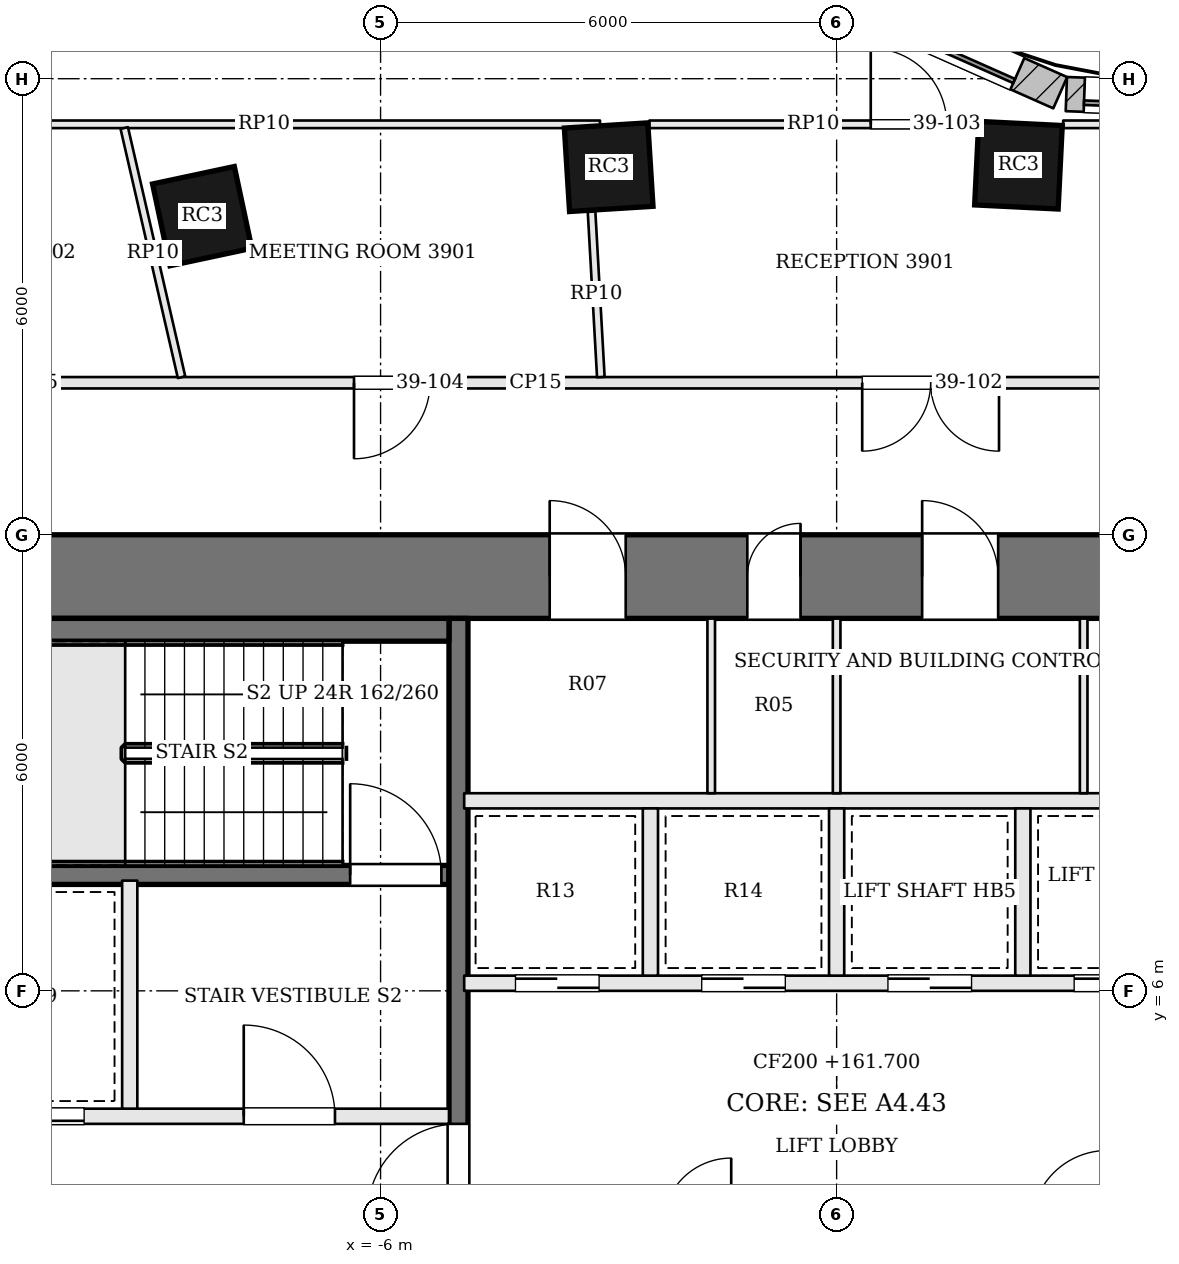
"""IFC4 building model, lengths in metres.
Left out: names, types, materials, properties, quantities, classifications, styles, units other than length and angle.
Written with IfcOpenShell. Run it as: python <this file> out.ifc"""

import sys

from ifc_helpers import new_model, si_unit, direction, frame, frame_2d, origin, origin_2d, place, context, subcontext, project, spatial, rectangle, extrude, element, fill, save


model = new_model("IFC4")
c1 = context("Model", 3, precision=1e-05, world=origin(), true_north=direction((0.0, 1.0)))
c2 = subcontext(c1, "Body", "Model", "MODEL_VIEW")
j1 = project(units=[si_unit("LENGTHUNIT", "METRE"), si_unit("PLANEANGLEUNIT", "RADIAN")], contexts=[c1])
p1 = place(None, origin())
s1 = spatial("IfcSite", under=j1, at=p1, CompositionType="ELEMENT")
p2 = place(p1, origin())
s2 = spatial("IfcBuilding", under=s1, at=p2, CompositionType="ELEMENT")
p3 = place(p2, frame((0.0, 0.0, 161.7)))
s3 = spatial("IfcBuildingStorey", under=s2, at=p3, CompositionType="ELEMENT", Elevation=161.7)
p4 = place(p3, frame((-13.0, 11.45, 0.0), z_axis=(0.0, 0.0, 1.0), x_axis=(1.0, 0.0, 0.0)))
e1 = element("IfcWall", 1, at=p4, inside=s3, PredefinedType="SHEAR", context=c2, shape_type="SweptSolid", body=[
    extrude(rectangle(XDim=26.0, YDim=1.1, at=frame_2d((13.0, 0.0))), origin(), (0.0, 0.0, 1.0), 3.9),
])
p5 = place(p4, frame((9.225, 0.0, 0.0)))
e2 = element("IfcOpeningElement", 2, at=p5, cuts=e1, PredefinedType="OPENING", context=c2, shape_type="SweptSolid", body=[
    extrude(rectangle(XDim=1.0, YDim=2.1, at=frame_2d((0.5, 1.05))), frame((0.0, 0.56, 0.0), z_axis=(0.0, -1.0, 0.0), x_axis=(1.0, 0.0, 0.0)), (0.0, 0.0, 1.0), 1.12),
])
p6 = place(p4, frame((11.825, 0.0, 0.0)))
e3 = element("IfcOpeningElement", 3, at=p6, cuts=e1, PredefinedType="OPENING", context=c2, shape_type="SweptSolid", body=[
    extrude(rectangle(XDim=0.7, YDim=2.1, at=frame_2d((0.35, 1.05))), frame((0.0, 0.56, 0.0), z_axis=(0.0, -1.0, 0.0), x_axis=(1.0, 0.0, 0.0)), (0.0, 0.0, 1.0), 1.12),
])
p7 = place(p4, frame((14.125, 0.0, 0.0)))
e4 = element("IfcOpeningElement", 4, at=p7, cuts=e1, PredefinedType="OPENING", context=c2, shape_type="SweptSolid", body=[
    extrude(rectangle(XDim=1.0, YDim=2.1, at=frame_2d((0.5, 1.05))), frame((0.0, 0.56, 0.0), z_axis=(0.0, -1.0, 0.0), x_axis=(1.0, 0.0, 0.0)), (0.0, 0.0, 1.0), 1.12),
])
p8 = place(p4, frame((16.625, 0.0, 0.0)))
e5 = element("IfcOpeningElement", 5, at=p8, cuts=e1, PredefinedType="OPENING", context=c2, shape_type="SweptSolid", body=[
    extrude(rectangle(XDim=0.9, YDim=2.1, at=frame_2d((0.45, 1.05))), frame((0.0, 0.56, 0.0), z_axis=(0.0, -1.0, 0.0), x_axis=(1.0, 0.0, 0.0)), (0.0, 0.0, 1.0), 1.12),
])
for number, where, z_axis, x_axis in (
    (6, (2.392, 16.862, 0.0), (0.0, 0.0, 1.0), (-0.999, 0.049, 0.0)),
    (7, (-2.999, 16.836, 0.0), (0.0, 0.0, 1.0), (-0.998, -0.062, 0.0)),
    (8, (-8.347, 16.192, 0.0), (0.0, 0.0, 1.0), (-0.978, -0.209, 0.0)),
):
    element("IfcColumn", number, at=place(p3, frame(where, z_axis=z_axis, x_axis=x_axis)), inside=s3, PredefinedType="COLUMN", context=c2, shape_type="SweptSolid", body=[
        extrude(rectangle(XDim=1.1, YDim=1.1, at=origin_2d()), origin(), (0.0, 0.0, 1.0), 3.9),
    ])
p9 = place(p3, frame((5.594, 17.704, 0.0), z_axis=(0.0, 0.0, 1.0), x_axis=(-0.999339560591, 0.036337895349, 0.0)))
e9 = element("IfcWall", 9, at=p9, inside=s3, PredefinedType="SOLIDWALL", context=c2, shape_type="SweptSolid", body=[
    extrude(rectangle(XDim=2.573, YDim=0.45, at=frame_2d((1.287, 0.0))), origin(), (0.0, 0.0, 1.0), 3.7),
])
p10 = place(p9, frame((0.237, 0.0, 0.9)))
e10 = element("IfcOpeningElement", 10, at=p10, cuts=e9, PredefinedType="OPENING", context=c2, shape_type="SweptSolid", body=[
    extrude(rectangle(XDim=2.1, YDim=2.3, at=frame_2d((1.05, 1.15))), frame((0.0, 0.235, 0.0), z_axis=(0.0, -1.0, 0.0), x_axis=(1.0, 0.0, 0.0)), (0.0, 0.0, 1.0), 0.47),
])
p11 = place(p3, frame((2.942, 17.816, 0.0), z_axis=(0.0, 0.0, 1.0), x_axis=(-0.91414046241, 0.405397601109, 0.0)))
e11 = element("IfcWall", 11, at=p11, inside=s3, PredefinedType="SOLIDWALL", context=c2, shape_type="SweptSolid", body=[
    extrude(rectangle(XDim=3.333, YDim=0.45, at=frame_2d((1.667, 0.0))), origin(), (0.0, 0.0, 1.0), 3.7),
])
p12 = place(p11, frame((0.617, 0.0, 0.9)))
e12 = element("IfcOpeningElement", 12, at=p12, cuts=e11, PredefinedType="OPENING", context=c2, shape_type="SweptSolid", body=[
    extrude(rectangle(XDim=2.1, YDim=2.3, at=frame_2d((1.05, 1.15))), frame((0.0, 0.235, 0.0), z_axis=(0.0, -1.0, 0.0), x_axis=(1.0, 0.0, 0.0)), (0.0, 0.0, 1.0), 0.47),
])
p13 = place(p3, frame((-9.984, 19.745, 0.0), z_axis=(0.0, 0.0, 1.0), x_axis=(-0.701875966769, -0.712299183821, 0.0)))
e13 = element("IfcWall", 13, at=p13, inside=s3, PredefinedType="SOLIDWALL", context=c2, shape_type="SweptSolid", body=[
    extrude(rectangle(XDim=3.537, YDim=0.45, at=frame_2d((1.769, 0.0))), origin(), (0.0, 0.0, 1.0), 3.7),
])
p14 = place(p13, frame((0.718, 0.0, 0.9)))
e14 = element("IfcOpeningElement", 14, at=p14, cuts=e13, PredefinedType="OPENING", context=c2, shape_type="SweptSolid", body=[
    extrude(rectangle(XDim=2.1, YDim=2.3, at=frame_2d((1.05, 1.15))), frame((0.0, 0.235, 0.0), z_axis=(0.0, -1.0, 0.0), x_axis=(1.0, 0.0, 0.0)), (0.0, 0.0, 1.0), 0.47),
])
p15 = place(p3, frame((-11.9, 4.35, 0.0), z_axis=(0.0, 0.0, 1.0), x_axis=(1.0, 0.0, 0.0)))
e15 = element("IfcWall", 15, at=p15, inside=s3, PredefinedType="SOLIDWALL", context=c2, shape_type="SweptSolid", body=[
    extrude(rectangle(XDim=6.8, YDim=0.2, at=frame_2d((3.4, 0.0))), origin(), (0.0, 0.0, 1.0), 3.7),
])
p16 = place(p15, frame((4.1, 0.0, 0.0)))
e16 = element("IfcOpeningElement", 16, at=p16, cuts=e15, PredefinedType="OPENING", context=c2, shape_type="SweptSolid", body=[
    extrude(rectangle(XDim=1.2, YDim=2.1, at=frame_2d((0.6, 1.05))), frame((0.0, 0.11, 0.0), z_axis=(0.0, -1.0, 0.0), x_axis=(1.0, 0.0, 0.0)), (0.0, 0.0, 1.0), 0.22),
])
p17 = place(p15, frame((0.8, 0.0, 0.0)))
e17 = element("IfcOpeningElement", 17, at=p17, cuts=e15, PredefinedType="OPENING", context=c2, shape_type="SweptSolid", body=[
    extrude(rectangle(XDim=1.2, YDim=2.1, at=frame_2d((0.6, 1.05))), frame((0.0, 0.11, 0.0), z_axis=(0.0, -1.0, 0.0), x_axis=(1.0, 0.0, 0.0)), (0.0, 0.0, 1.0), 0.22),
])
p18 = place(p3, frame((-11.9, 7.525, 0.0), z_axis=(0.0, 0.0, 1.0), x_axis=(1.0, 0.0, 0.0)))
e18 = element("IfcWall", 18, at=p18, inside=s3, PredefinedType="SOLIDWALL", context=c2, shape_type="SweptSolid", body=[
    extrude(rectangle(XDim=6.8, YDim=0.25, at=frame_2d((3.4, 0.0))), origin(), (0.0, 0.0, 1.0), 3.7),
])
p19 = place(p18, frame((5.5, 0.0, 0.0)))
e19 = element("IfcOpeningElement", 19, at=p19, cuts=e18, PredefinedType="OPENING", context=c2, shape_type="SweptSolid", body=[
    extrude(rectangle(XDim=1.2, YDim=2.1, at=frame_2d((0.6, 1.05))), frame((0.0, 0.135, 0.0), z_axis=(0.0, -1.0, 0.0), x_axis=(1.0, 0.0, 0.0)), (0.0, 0.0, 1.0), 0.27),
])
p20 = place(p3, frame((-9.3, 4.45, 0.0), z_axis=(0.0, 0.0, 1.0), x_axis=(0.0, 1.0, 0.0)))
e20 = element("IfcWall", 20, at=p20, inside=s3, PredefinedType="SOLIDWALL", context=c2, shape_type="SweptSolid", body=[
    extrude(rectangle(XDim=3.0, YDim=0.2, at=frame_2d((1.5, 0.0))), origin(), (0.0, 0.0, 1.0), 3.7),
])
p21 = place(p3, frame((-4.975, -1.9, 0.0), z_axis=(0.0, 0.0, 1.0), x_axis=(0.0, 1.0, 0.0)))
e21 = element("IfcWall", 21, at=p21, inside=s3, PredefinedType="SOLIDWALL", context=c2, shape_type="SweptSolid", body=[
    extrude(rectangle(XDim=12.8, YDim=0.25, at=frame_2d((6.4, 0.0))), origin(), (0.0, 0.0, 1.0), 3.7),
])
p22 = place(p21, frame((4.95, 0.0, 0.0)))
e22 = element("IfcOpeningElement", 22, at=p22, cuts=e21, PredefinedType="OPENING", context=c2, shape_type="SweptSolid", body=[
    extrude(rectangle(XDim=1.2, YDim=2.1, at=frame_2d((0.6, 1.05))), frame((0.0, 0.135, 0.0), z_axis=(0.0, -1.0, 0.0), x_axis=(1.0, 0.0, 0.0)), (0.0, 0.0, 1.0), 0.27),
])
p23 = place(p3, frame((-11.9, 10.75, 0.0), z_axis=(0.0, 0.0, 1.0), x_axis=(1.0, 0.0, 0.0)))
e23 = element("IfcWall", 23, at=p23, inside=s3, PredefinedType="SOLIDWALL", context=c2, shape_type="SweptSolid", body=[
    extrude(rectangle(XDim=6.8, YDim=0.3, at=frame_2d((3.4, 0.0))), origin(), (0.0, 0.0, 1.0), 3.7),
])
p24 = place(p3, frame((-4.9, 6.1, 0.0), z_axis=(0.0, 0.0, 1.0), x_axis=(1.0, 0.0, 0.0)))
e24 = element("IfcWall", 24, at=p24, inside=s3, PredefinedType="SOLIDWALL", context=c2, shape_type="SweptSolid", body=[
    extrude(rectangle(XDim=9.8, YDim=0.2, at=frame_2d((4.9, 0.0))), origin(), (0.0, 0.0, 1.0), 3.7),
])
p25 = place(p24, frame((0.675, 0.0, 0.0)))
e25 = element("IfcOpeningElement", 25, at=p25, cuts=e24, PredefinedType="OPENING", context=c2, shape_type="SweptSolid", body=[
    extrude(rectangle(XDim=1.1, YDim=2.1, at=frame_2d((0.55, 1.05))), frame((0.0, 0.11, 0.0), z_axis=(0.0, -1.0, 0.0), x_axis=(1.0, 0.0, 0.0)), (0.0, 0.0, 1.0), 0.22),
])
p26 = place(p24, frame((3.125, 0.0, 0.0)))
e26 = element("IfcOpeningElement", 26, at=p26, cuts=e24, PredefinedType="OPENING", context=c2, shape_type="SweptSolid", body=[
    extrude(rectangle(XDim=1.1, YDim=2.1, at=frame_2d((0.55, 1.05))), frame((0.0, 0.11, 0.0), z_axis=(0.0, -1.0, 0.0), x_axis=(1.0, 0.0, 0.0)), (0.0, 0.0, 1.0), 0.22),
])
p27 = place(p24, frame((5.575, 0.0, 0.0)))
e27 = element("IfcOpeningElement", 27, at=p27, cuts=e24, PredefinedType="OPENING", context=c2, shape_type="SweptSolid", body=[
    extrude(rectangle(XDim=1.1, YDim=2.1, at=frame_2d((0.55, 1.05))), frame((0.0, 0.11, 0.0), z_axis=(0.0, -1.0, 0.0), x_axis=(1.0, 0.0, 0.0)), (0.0, 0.0, 1.0), 0.22),
])
p28 = place(p24, frame((8.025, 0.0, 0.0)))
e28 = element("IfcOpeningElement", 28, at=p28, cuts=e24, PredefinedType="OPENING", context=c2, shape_type="SweptSolid", body=[
    extrude(rectangle(XDim=1.1, YDim=2.1, at=frame_2d((0.55, 1.05))), frame((0.0, 0.11, 0.0), z_axis=(0.0, -1.0, 0.0), x_axis=(1.0, 0.0, 0.0)), (0.0, 0.0, 1.0), 0.22),
])
p29 = place(p3, frame((-4.9, 8.5, 0.0), z_axis=(0.0, 0.0, 1.0), x_axis=(1.0, 0.0, 0.0)))
e29 = element("IfcWall", 29, at=p29, inside=s3, PredefinedType="SOLIDWALL", context=c2, shape_type="SweptSolid", body=[
    extrude(rectangle(XDim=9.8, YDim=0.2, at=frame_2d((4.9, 0.0))), origin(), (0.0, 0.0, 1.0), 3.7),
])
for number, where, z_axis, x_axis in (
    (30, (-2.45, 6.2, 0.0), (0.0, 0.0, 1.0), (0.0, 1.0, 0.0)),
    (31, (0.0, 6.2, 0.0), (0.0, 0.0, 1.0), (0.0, 1.0, 0.0)),
    (32, (2.45, 6.2, 0.0), (0.0, 0.0, 1.0), (0.0, 1.0, 0.0)),
):
    element("IfcWall", number, at=place(p3, frame(where, z_axis=z_axis, x_axis=x_axis)), inside=s3, PredefinedType="SOLIDWALL", context=c2, shape_type="SweptSolid", body=[
        extrude(rectangle(XDim=2.2, YDim=0.2, at=frame_2d((1.1, 0.0))), origin(), (0.0, 0.0, 1.0), 3.7),
    ])
for number, where, z_axis, x_axis in (
    (33, (-1.65, 8.6, 0.0), (0.0, 0.0, 1.0), (0.0, 1.0, 0.0)),
    (34, (0.0, 8.6, 0.0), (0.0, 0.0, 1.0), (0.0, 1.0, 0.0)),
    (35, (3.25, 8.6, 0.0), (0.0, 0.0, 1.0), (0.0, 1.0, 0.0)),
):
    element("IfcWall", number, at=place(p3, frame(where, z_axis=z_axis, x_axis=x_axis)), inside=s3, PredefinedType="PARTITIONING", context=c2, shape_type="SweptSolid", body=[
        extrude(rectangle(XDim=2.3, YDim=0.1, at=frame_2d((1.15, 0.0))), origin(), (0.0, 0.0, 1.0), 3.7),
    ])
p30 = place(p3, frame((5.497, 14.0, 0.0), z_axis=(0.0, 0.0, 1.0), x_axis=(-1.0, 0.0, 0.0)))
e36 = element("IfcWall", 36, at=p30, inside=s3, PredefinedType="PARTITIONING", context=c2, shape_type="SweptSolid", body=[
    extrude(rectangle(XDim=18.917, YDim=0.15, at=frame_2d((9.458, 0.0))), origin(), (0.0, 0.0, 1.0), 3.198),
])
p31 = place(p30, frame((3.36, 0.0, 0.0)))
e37 = element("IfcOpeningElement", 37, at=p31, cuts=e36, PredefinedType="OPENING", context=c2, shape_type="SweptSolid", body=[
    extrude(rectangle(XDim=1.8, YDim=2.1, at=frame_2d((0.9, 1.05))), frame((0.0, 0.085, 0.0), z_axis=(0.0, -1.0, 0.0), x_axis=(1.0, 0.0, 0.0)), (0.0, 0.0, 1.0), 0.17),
])
p32 = place(p30, frame((10.846, 0.0, 0.0)))
e38 = element("IfcOpeningElement", 38, at=p32, cuts=e36, PredefinedType="OPENING", context=c2, shape_type="SweptSolid", body=[
    extrude(rectangle(XDim=1.0, YDim=2.4, at=frame_2d((0.5, 1.2))), frame((0.0, 0.085, 0.0), z_axis=(0.0, -1.0, 0.0), x_axis=(1.0, 0.0, 0.0)), (0.0, 0.0, 1.0), 0.17),
])
p33 = place(p30, frame((16.194, 0.0, 0.0)))
e39 = element("IfcOpeningElement", 39, at=p33, cuts=e36, PredefinedType="OPENING", context=c2, shape_type="SweptSolid", body=[
    extrude(rectangle(XDim=1.0, YDim=2.4, at=frame_2d((0.5, 1.2))), frame((0.0, 0.085, 0.0), z_axis=(0.0, -1.0, 0.0), x_axis=(1.0, 0.0, 0.0)), (0.0, 0.0, 1.0), 0.17),
])
p34 = place(p3, frame((-11.951, 17.4, 0.0), z_axis=(0.0, 0.0, 1.0), x_axis=(1.0, 0.0, 0.0)))
e40 = element("IfcWall", 40, at=p34, inside=s3, PredefinedType="PARTITIONING", context=c2, shape_type="SweptSolid", body=[
    extrude(rectangle(XDim=8.838, YDim=0.1, at=frame_2d((4.419, 0.0))), origin(), (0.0, 0.0, 1.0), 3.198),
])
p35 = place(p3, frame((-2.463, 17.4, 0.0), z_axis=(0.0, 0.0, 1.0), x_axis=(1.0, 0.0, 0.0)))
e41 = element("IfcWall", 41, at=p35, inside=s3, PredefinedType="PARTITIONING", context=c2, shape_type="SweptSolid", body=[
    extrude(rectangle(XDim=4.311, YDim=0.1, at=frame_2d((2.156, 0.0))), origin(), (0.0, 0.0, 1.0), 3.198),
])
p36 = place(p35, frame((2.912, 0.0, 0.0)))
e42 = element("IfcOpeningElement", 42, at=p36, cuts=e41, PredefinedType="OPENING", context=c2, shape_type="SweptSolid", body=[
    extrude(rectangle(XDim=1.0, YDim=2.1, at=frame_2d((0.5, 1.05))), frame((0.0, 0.06, 0.0), z_axis=(0.0, -1.0, 0.0), x_axis=(1.0, 0.0, 0.0)), (0.0, 0.0, 1.0), 0.12),
])
p37 = place(p3, frame((2.981, 17.4, 0.0), z_axis=(0.0, 0.0, 1.0), x_axis=(1.0, 0.0, 0.0)))
e43 = element("IfcWall", 43, at=p37, inside=s3, PredefinedType="PARTITIONING", context=c2, shape_type="SweptSolid", body=[
    extrude(rectangle(XDim=2.99, YDim=0.1, at=frame_2d((1.495, 0.0))), origin(), (0.0, 0.0, 1.0), 3.198),
])
p38 = place(p3, frame((-3.102, 14.075, 0.0), z_axis=(0.0, 0.0, 1.0), x_axis=(-0.055904356841, 0.998436128596, 0.0)))
e44 = element("IfcWall", 44, at=p38, inside=s3, PredefinedType="PARTITIONING", context=c2, shape_type="SweptSolid", body=[
    extrude(rectangle(XDim=2.179, YDim=0.1, at=frame_2d((1.09, 0.0))), origin(), (0.0, 0.0, 1.0), 3.198),
])
p39 = place(p3, frame((-8.618, 14.073, 0.0), z_axis=(0.0, 0.0, 1.0), x_axis=(-0.224048430302, 0.974578011695, 0.0)))
e45 = element("IfcWall", 45, at=p39, inside=s3, PredefinedType="PARTITIONING", context=c2, shape_type="SweptSolid", body=[
    extrude(rectangle(XDim=3.364, YDim=0.1, at=frame_2d((1.682, 0.0))), origin(), (0.0, 0.0, 1.0), 3.198),
])
p40 = place(p10, origin())
e46 = element("IfcWindow", 46, at=p40, inside=s3, PartitioningType="SINGLE_PANEL", PredefinedType="WINDOW", context=c2, shape_type="SweptSolid", body=[
    extrude(rectangle(XDim=2.1, YDim=2.3, at=frame_2d((1.05, 1.15))), frame((0.0, 0.135, 0.0), z_axis=(0.0, -1.0, 0.0), x_axis=(1.0, 0.0, 0.0)), (0.0, 0.0, 1.0), 0.06),
])
fill(e10, e46)
p41 = place(p12, origin())
e47 = element("IfcWindow", 47, at=p41, inside=s3, PartitioningType="SINGLE_PANEL", PredefinedType="WINDOW", context=c2, shape_type="SweptSolid", body=[
    extrude(rectangle(XDim=2.1, YDim=2.3, at=frame_2d((1.05, 1.15))), frame((0.0, 0.135, 0.0), z_axis=(0.0, -1.0, 0.0), x_axis=(1.0, 0.0, 0.0)), (0.0, 0.0, 1.0), 0.06),
])
fill(e12, e47)
p42 = place(p22, origin())
e48 = element("IfcDoor", 48, at=p42, inside=s3, OperationType="SINGLE_SWING_LEFT", PredefinedType="DOOR", context=c2, shape_type="SweptSolid", body=[
    extrude(rectangle(XDim=1.2, YDim=2.1, at=frame_2d((0.6, 1.05))), frame((0.0, 0.025, 0.0), z_axis=(0.0, -1.0, 0.0), x_axis=(1.0, 0.0, 0.0)), (0.0, 0.0, 1.0), 0.05),
])
fill(e22, e48)
p43 = place(p16, origin())
e49 = element("IfcDoor", 49, at=p43, inside=s3, OperationType="SINGLE_SWING_LEFT", PredefinedType="DOOR", context=c2, shape_type="SweptSolid", body=[
    extrude(rectangle(XDim=1.2, YDim=2.1, at=frame_2d((0.6, 1.05))), frame((0.0, 0.025, 0.0), z_axis=(0.0, -1.0, 0.0), x_axis=(1.0, 0.0, 0.0)), (0.0, 0.0, 1.0), 0.05),
])
fill(e16, e49)
p44 = place(p19, origin())
e50 = element("IfcDoor", 50, at=p44, inside=s3, OperationType="SINGLE_SWING_LEFT", PredefinedType="DOOR", context=c2, shape_type="SweptSolid", body=[
    extrude(rectangle(XDim=1.2, YDim=2.1, at=frame_2d((0.6, 1.05))), frame((0.0, 0.025, 0.0), z_axis=(0.0, -1.0, 0.0), x_axis=(1.0, 0.0, 0.0)), (0.0, 0.0, 1.0), 0.05),
])
fill(e19, e50)
p45 = place(p17, origin())
e51 = element("IfcDoor", 51, at=p45, inside=s3, OperationType="SLIDING_TO_RIGHT", PredefinedType="DOOR", context=c2, shape_type="SweptSolid", body=[
    extrude(rectangle(XDim=1.2, YDim=2.1, at=frame_2d((0.6, 1.05))), frame((0.0, 0.025, 0.0), z_axis=(0.0, -1.0, 0.0), x_axis=(1.0, 0.0, 0.0)), (0.0, 0.0, 1.0), 0.05),
])
fill(e17, e51)
p46 = place(p25, origin())
e52 = element("IfcDoor", 52, at=p46, inside=s3, OperationType="SLIDING_TO_RIGHT", PredefinedType="DOOR", context=c2, shape_type="SweptSolid", body=[
    extrude(rectangle(XDim=1.1, YDim=2.1, at=frame_2d((0.55, 1.05))), frame((0.0, 0.025, 0.0), z_axis=(0.0, -1.0, 0.0), x_axis=(1.0, 0.0, 0.0)), (0.0, 0.0, 1.0), 0.05),
])
fill(e25, e52)
p47 = place(p26, origin())
e53 = element("IfcDoor", 53, at=p47, inside=s3, OperationType="SLIDING_TO_LEFT", PredefinedType="DOOR", context=c2, shape_type="SweptSolid", body=[
    extrude(rectangle(XDim=1.1, YDim=2.1, at=frame_2d((0.55, 1.05))), frame((0.0, 0.025, 0.0), z_axis=(0.0, -1.0, 0.0), x_axis=(1.0, 0.0, 0.0)), (0.0, 0.0, 1.0), 0.05),
])
fill(e26, e53)
p48 = place(p27, origin())
e54 = element("IfcDoor", 54, at=p48, inside=s3, OperationType="SLIDING_TO_RIGHT", PredefinedType="DOOR", context=c2, shape_type="SweptSolid", body=[
    extrude(rectangle(XDim=1.1, YDim=2.1, at=frame_2d((0.55, 1.05))), frame((0.0, 0.025, 0.0), z_axis=(0.0, -1.0, 0.0), x_axis=(1.0, 0.0, 0.0)), (0.0, 0.0, 1.0), 0.05),
])
fill(e27, e54)
p49 = place(p28, origin())
e55 = element("IfcDoor", 55, at=p49, inside=s3, OperationType="SLIDING_TO_LEFT", PredefinedType="DOOR", context=c2, shape_type="SweptSolid", body=[
    extrude(rectangle(XDim=1.1, YDim=2.1, at=frame_2d((0.55, 1.05))), frame((0.0, 0.025, 0.0), z_axis=(0.0, -1.0, 0.0), x_axis=(1.0, 0.0, 0.0)), (0.0, 0.0, 1.0), 0.05),
])
fill(e28, e55)
p50 = place(p5, origin())
e56 = element("IfcDoor", 56, at=p50, inside=s3, OperationType="SINGLE_SWING_LEFT", PredefinedType="DOOR", context=c2, shape_type="SweptSolid", body=[
    extrude(rectangle(XDim=1.0, YDim=2.1, at=frame_2d((0.5, 1.05))), frame((0.0, 0.025, 0.0), z_axis=(0.0, -1.0, 0.0), x_axis=(1.0, 0.0, 0.0)), (0.0, 0.0, 1.0), 0.05),
])
fill(e2, e56)
p51 = place(p6, origin())
e57 = element("IfcDoor", 57, at=p51, inside=s3, OperationType="SINGLE_SWING_RIGHT", PredefinedType="DOOR", context=c2, shape_type="SweptSolid", body=[
    extrude(rectangle(XDim=0.7, YDim=2.1, at=frame_2d((0.35, 1.05))), frame((0.0, 0.025, 0.0), z_axis=(0.0, -1.0, 0.0), x_axis=(1.0, 0.0, 0.0)), (0.0, 0.0, 1.0), 0.05),
])
fill(e3, e57)
p52 = place(p7, origin())
e58 = element("IfcDoor", 58, at=p52, inside=s3, OperationType="SINGLE_SWING_LEFT", PredefinedType="DOOR", context=c2, shape_type="SweptSolid", body=[
    extrude(rectangle(XDim=1.0, YDim=2.1, at=frame_2d((0.5, 1.05))), frame((0.0, 0.025, 0.0), z_axis=(0.0, -1.0, 0.0), x_axis=(1.0, 0.0, 0.0)), (0.0, 0.0, 1.0), 0.05),
])
fill(e4, e58)
p53 = place(p31, origin())
e59 = element("IfcDoor", 59, at=p53, inside=s3, OperationType="DOUBLE_DOOR_SINGLE_SWING", PredefinedType="DOOR", context=c2, shape_type="SweptSolid", body=[
    extrude(rectangle(XDim=1.8, YDim=2.1, at=frame_2d((0.9, 1.05))), frame((0.0, 0.025, 0.0), z_axis=(0.0, -1.0, 0.0), x_axis=(1.0, 0.0, 0.0)), (0.0, 0.0, 1.0), 0.05),
])
fill(e37, e59)
p54 = place(p36, origin())
e60 = element("IfcDoor", 60, at=p54, inside=s3, OperationType="SINGLE_SWING_LEFT", PredefinedType="DOOR", context=c2, shape_type="SweptSolid", body=[
    extrude(rectangle(XDim=1.0, YDim=2.1, at=frame_2d((0.5, 1.05))), frame((0.0, 0.025, 0.0), z_axis=(0.0, -1.0, 0.0), x_axis=(1.0, 0.0, 0.0)), (0.0, 0.0, 1.0), 0.05),
])
fill(e42, e60)
p55 = place(p32, origin())
e61 = element("IfcDoor", 61, at=p55, inside=s3, OperationType="SINGLE_SWING_RIGHT", PredefinedType="DOOR", context=c2, shape_type="SweptSolid", body=[
    extrude(rectangle(XDim=1.0, YDim=2.4, at=frame_2d((0.5, 1.2))), frame((0.0, 0.025, 0.0), z_axis=(0.0, -1.0, 0.0), x_axis=(1.0, 0.0, 0.0)), (0.0, 0.0, 1.0), 0.05),
])
fill(e38, e61)
save(model, sys.argv[1])
